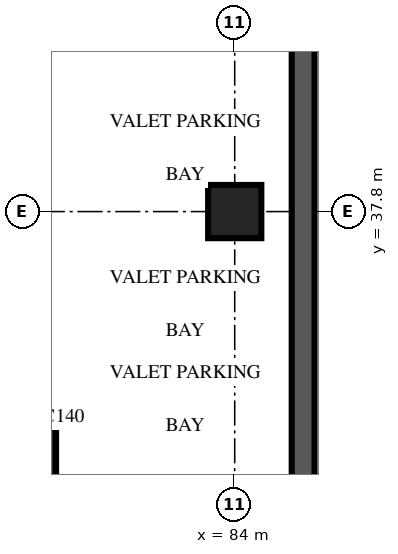
"""IFC4 building model, lengths in metres.
Left out: names, types, materials, properties, quantities, classifications, styles, units other than length and angle.
Written with IfcOpenShell. Run it as: python <this file> out.ifc"""

import sys

from ifc_helpers import new_model, si_unit, direction, frame, frame_2d, origin, origin_2d, place, context, subcontext, project, spatial, rectangle, extrude, source, transform, mapped, element, save


model = new_model("IFC4")
c1 = context("Model", 3, precision=1e-05, world=origin(), true_north=direction((0.0, 1.0)))
c2 = subcontext(c1, "Body", "Model", "MODEL_VIEW")
j1 = project(units=[si_unit("LENGTHUNIT", "METRE"), si_unit("PLANEANGLEUNIT", "RADIAN")], contexts=[c1])
p1 = place(None, origin())
s1 = spatial("IfcSite", under=j1, at=p1, CompositionType="ELEMENT")
p2 = place(p1, origin())
s2 = spatial("IfcBuilding", under=s1, at=p2, CompositionType="ELEMENT")
p3 = place(p2, frame((0.0, 0.0, -4.5)))
s3 = spatial("IfcBuildingStorey", under=s2, at=p3, CompositionType="ELEMENT", Elevation=-4.5)
m1 = source(origin(), c2, "Body", "SweptSolid", [
    extrude(rectangle(XDim=55.68, YDim=0.6, at=frame_2d((27.84, 0.0))), origin(), (0.0, 0.0, 1.0), 4.5),
])
p4 = place(p3, frame((85.8, -1.5, 0.0), z_axis=(0.0, 0.0, 1.0), x_axis=(0.0, 1.0, 0.0)))
e1 = element("IfcWall", 1, at=p4, inside=s3, PredefinedType="SOLIDWALL", context=c2, shape_type="MappedRepresentation", body=[
    mapped(m1, transform((0.0, 0.0, 0.0), scale=1.0)),
])
m2 = source(origin(), c2, "Body", "SweptSolid", [
    extrude(rectangle(XDim=1.4, YDim=1.4, at=origin_2d()), origin(), (0.0, 0.0, 1.0), 4.5),
])
for number, where, z_axis, x_axis in (
    (2, (78.6, 31.5, 0.0), (0.0, 0.0, 1.0), (1.0, 0.0, 0.0)),
    (3, (84.0, 37.8, 0.0), (0.0, 0.0, 1.0), (1.0, 0.0, 0.0)),
):
    element("IfcColumn", number, at=place(p3, frame(where, z_axis=z_axis, x_axis=x_axis)), inside=s3, PredefinedType="COLUMN", context=c2, shape_type="MappedRepresentation", body=[
        mapped(m2, transform((0.0, 0.0, 0.0), scale=1.0)),
    ])
save(model, sys.argv[1])
